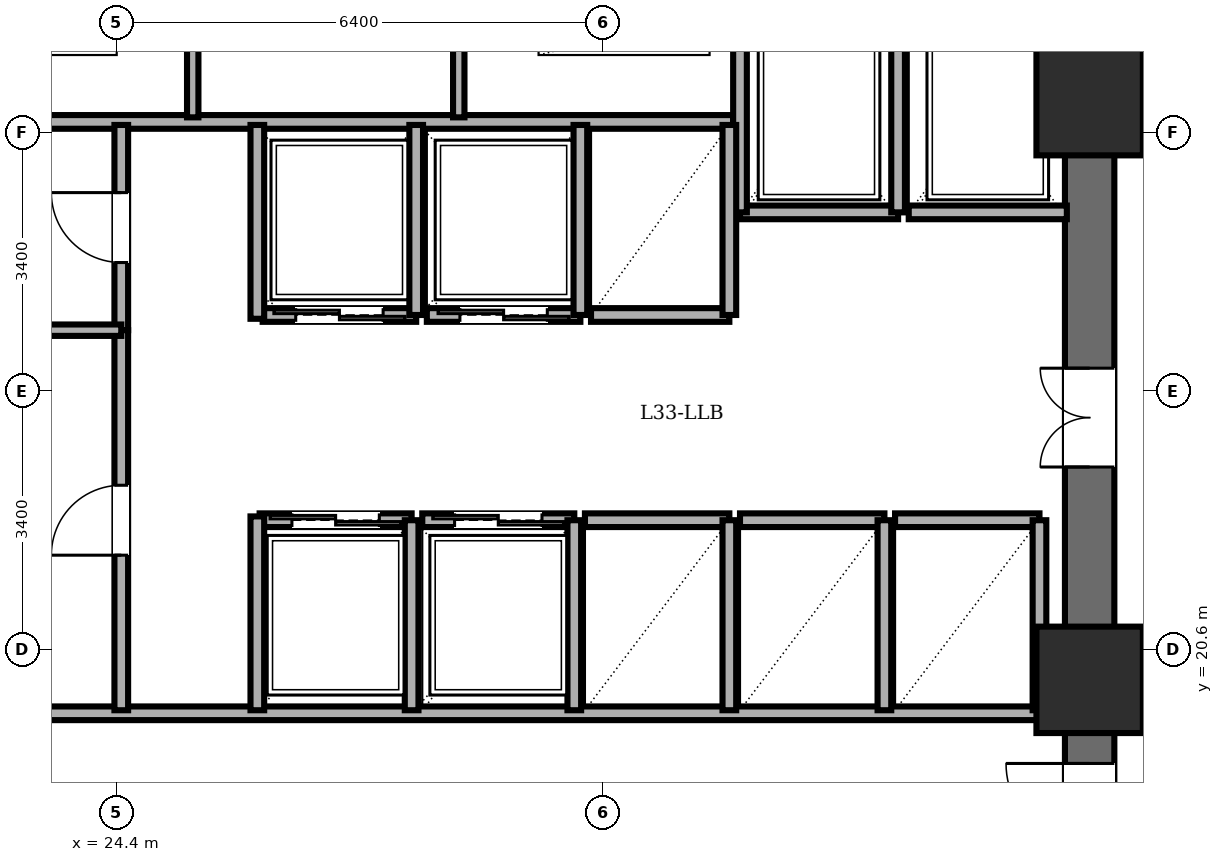
"""IFC4 building model, lengths in metres.
Left out: names, types, materials, properties, quantities, classifications, styles, units other than length and angle.
Written with IfcOpenShell. Run it as: python <this file> out.ifc"""

import sys

from ifc_helpers import new_model, si_unit, direction, frame, frame_2d, origin, origin_2d, place, context, subcontext, project, spatial, rectangle, extrude, element, fill, save


model = new_model("IFC4")
c1 = context("Model", 3, precision=1e-05, world=origin(), true_north=direction((0.0, 1.0)))
c2 = subcontext(c1, "Body", "Model", "MODEL_VIEW")
j1 = project(units=[si_unit("LENGTHUNIT", "METRE"), si_unit("PLANEANGLEUNIT", "RADIAN")], contexts=[c1])
p1 = place(None, origin())
s1 = spatial("IfcSite", under=j1, at=p1, CompositionType="ELEMENT")
p2 = place(p1, origin())
s2 = spatial("IfcBuilding", under=s1, at=p2, CompositionType="ELEMENT")
p3 = place(p2, frame((0.0, 0.0, 125.9)))
s3 = spatial("IfcBuildingStorey", under=s2, at=p3, CompositionType="ELEMENT", Elevation=125.9)
for number, where, z_axis, x_axis in (
    (1, (37.2, 20.2, 0.0), (0.0, 0.0, 1.0), (1.0, 0.0, 0.0)),
    (2, (37.2, 27.8, 0.0), (0.0, 0.0, 1.0), (1.0, 0.0, 0.0)),
):
    element("IfcColumn", number, at=place(p3, frame(where, z_axis=z_axis, x_axis=x_axis)), inside=s3, PredefinedType="COLUMN", context=c2, shape_type="SweptSolid", body=[
        extrude(rectangle(XDim=1.4, YDim=1.4, at=origin_2d()), origin(), (0.0, 0.0, 1.0), 3.6),
    ])
p4 = place(p3, frame((37.2, 14.4, 0.0), z_axis=(0.0, 0.0, 1.0), x_axis=(0.0, 1.0, 0.0)))
e3 = element("IfcWall", 3, at=p4, inside=s3, PredefinedType="SHEAR", context=c2, shape_type="SweptSolid", body=[
    extrude(rectangle(XDim=19.2, YDim=0.65, at=frame_2d((9.6, 0.0))), origin(), (0.0, 0.0, 1.0), 3.4),
])
p5 = place(p4, frame((15.8, 0.0, 0.0)))
e4 = element("IfcOpeningElement", 4, at=p5, cuts=e3, PredefinedType="OPENING", context=c2, shape_type="SweptSolid", body=[
    extrude(rectangle(XDim=1.15, YDim=2.15, at=frame_2d((0.575, 1.075))), frame((0.0, 0.335, 0.0), z_axis=(0.0, -1.0, 0.0), x_axis=(1.0, 0.0, 0.0)), (0.0, 0.0, 1.0), 0.67),
])
p6 = place(p4, frame((3.6, 0.0, 0.0)))
e5 = element("IfcOpeningElement", 5, at=p6, cuts=e3, PredefinedType="OPENING", context=c2, shape_type="SweptSolid", body=[
    extrude(rectangle(XDim=1.1, YDim=2.15, at=frame_2d((0.55, 1.075))), frame((0.0, 0.335, 0.0), z_axis=(0.0, -1.0, 0.0), x_axis=(1.0, 0.0, 0.0)), (0.0, 0.0, 1.0), 0.67),
])
p7 = place(p4, frame((8.6, 0.0, 0.0)))
e6 = element("IfcOpeningElement", 6, at=p7, cuts=e3, PredefinedType="OPENING", context=c2, shape_type="SweptSolid", body=[
    extrude(rectangle(XDim=1.3, YDim=2.2, at=frame_2d((0.65, 1.1))), frame((0.0, 0.335, 0.0), z_axis=(0.0, -1.0, 0.0), x_axis=(1.0, 0.0, 0.0)), (0.0, 0.0, 1.0), 0.67),
])
p8 = place(p3, frame((21.95, 27.54, 0.0), z_axis=(0.0, 0.0, 1.0), x_axis=(1.0, 0.0, 0.0)))
e7 = element("IfcWall", 7, at=p8, inside=s3, PredefinedType="PARTITIONING", context=c2, shape_type="SweptSolid", body=[
    extrude(rectangle(XDim=10.56, YDim=0.18, at=frame_2d((5.28, 0.0))), origin(), (0.0, 0.0, 1.0), 3.4),
])
for number, where, z_axis, x_axis in (
    (8, (25.4, 27.6, 0.0), (0.0, 0.0, 1.0), (0.0, 1.0, 0.0)),
    (9, (28.9, 27.6, 0.0), (0.0, 0.0, 1.0), (0.0, 1.0, 0.0)),
):
    element("IfcWall", number, at=place(p3, frame(where, z_axis=z_axis, x_axis=x_axis)), inside=s3, PredefinedType="PARTITIONING", context=c2, shape_type="SweptSolid", body=[
        extrude(rectangle(XDim=1.52, YDim=0.15, at=frame_2d((0.76, 0.0))), origin(), (0.0, 0.0, 1.0), 3.4),
    ])
p9 = place(p3, frame((21.95, 19.76, 0.0), z_axis=(0.0, 0.0, 1.0), x_axis=(1.0, 0.0, 0.0)))
e10 = element("IfcWall", 10, at=p9, inside=s3, PredefinedType="PARTITIONING", context=c2, shape_type="SweptSolid", body=[
    extrude(rectangle(XDim=14.87, YDim=0.18, at=frame_2d((7.435, 0.0))), origin(), (0.0, 0.0, 1.0), 3.4),
])
p10 = place(p3, frame((34.68, 26.35, 0.0), z_axis=(0.0, 0.0, 1.0), x_axis=(-1.0, 0.0, 0.0)))
e11 = element("IfcWall", 11, at=p10, inside=s3, PredefinedType="PARTITIONING", context=c2, shape_type="SweptSolid", body=[
    extrude(rectangle(XDim=2.08, YDim=0.18, at=frame_2d((1.04, 0.0))), origin(), (0.0, 0.0, 1.0), 3.4),
])
for number, where, z_axis, x_axis in (
    (12, (34.68, 26.35, 0.0), (0.0, 0.0, 1.0), (0.0, 1.0, 0.0)),
    (13, (32.6, 29.08, 0.0), (0.0, 0.0, 1.0), (0.0, -1.0, 0.0)),
):
    element("IfcWall", number, at=place(p3, frame(where, z_axis=z_axis, x_axis=x_axis)), inside=s3, PredefinedType="PARTITIONING", context=c2, shape_type="SweptSolid", body=[
        extrude(rectangle(XDim=2.73, YDim=0.18, at=frame_2d((1.365, 0.0))), origin(), (0.0, 0.0, 1.0), 3.4),
    ])
p11 = place(p3, frame((36.9, 26.35, 0.0), z_axis=(0.0, 0.0, 1.0), x_axis=(-1.0, 0.0, 0.0)))
e14 = element("IfcWall", 14, at=p11, inside=s3, PredefinedType="PARTITIONING", context=c2, shape_type="SweptSolid", body=[
    extrude(rectangle(XDim=2.08, YDim=0.18, at=frame_2d((1.04, 0.0))), origin(), (0.0, 0.0, 1.0), 3.4),
])
p12 = place(p3, frame((28.34, 25.0, 0.0), z_axis=(0.0, 0.0, 1.0), x_axis=(-1.0, 0.0, 0.0)))
e15 = element("IfcWall", 15, at=p12, inside=s3, PredefinedType="PARTITIONING", context=c2, shape_type="SweptSolid", body=[
    extrude(rectangle(XDim=2.02, YDim=0.18, at=frame_2d((1.01, 0.0))), origin(), (0.0, 0.0, 1.0), 3.4),
])
p13 = place(p12, frame((0.435, 0.0, 0.0)))
e16 = element("IfcOpeningElement", 16, at=p13, cuts=e15, PredefinedType="OPENING", context=c2, shape_type="SweptSolid", body=[
    extrude(rectangle(XDim=1.15, YDim=2.2, at=frame_2d((0.575, 1.1))), frame((0.0, 0.1, 0.0), z_axis=(0.0, -1.0, 0.0), x_axis=(1.0, 0.0, 0.0)), (0.0, 0.0, 1.0), 0.2),
])
p14 = place(p3, frame((28.34, 25.0, 0.0), z_axis=(0.0, 0.0, 1.0), x_axis=(0.0, 1.0, 0.0)))
e17 = element("IfcWall", 17, at=p14, inside=s3, PredefinedType="PARTITIONING", context=c2, shape_type="SweptSolid", body=[
    extrude(rectangle(XDim=2.5, YDim=0.18, at=frame_2d((1.25, 0.0))), origin(), (0.0, 0.0, 1.0), 3.4),
])
p15 = place(p3, frame((30.5, 25.0, 0.0), z_axis=(0.0, 0.0, 1.0), x_axis=(-1.0, 0.0, 0.0)))
e18 = element("IfcWall", 18, at=p15, inside=s3, PredefinedType="PARTITIONING", context=c2, shape_type="SweptSolid", body=[
    extrude(rectangle(XDim=2.02, YDim=0.18, at=frame_2d((1.01, 0.0))), origin(), (0.0, 0.0, 1.0), 3.4),
])
p16 = place(p15, frame((0.435, 0.0, 0.0)))
e19 = element("IfcOpeningElement", 19, at=p16, cuts=e18, PredefinedType="OPENING", context=c2, shape_type="SweptSolid", body=[
    extrude(rectangle(XDim=1.15, YDim=2.2, at=frame_2d((0.575, 1.1))), frame((0.0, 0.1, 0.0), z_axis=(0.0, -1.0, 0.0), x_axis=(1.0, 0.0, 0.0)), (0.0, 0.0, 1.0), 0.2),
])
p17 = place(p3, frame((30.5, 25.0, 0.0), z_axis=(0.0, 0.0, 1.0), x_axis=(0.0, 1.0, 0.0)))
e20 = element("IfcWall", 20, at=p17, inside=s3, PredefinedType="PARTITIONING", context=c2, shape_type="SweptSolid", body=[
    extrude(rectangle(XDim=2.5, YDim=0.18, at=frame_2d((1.25, 0.0))), origin(), (0.0, 0.0, 1.0), 3.4),
])
p18 = place(p3, frame((26.28, 22.3, 0.0), z_axis=(0.0, 0.0, 1.0), x_axis=(1.0, 0.0, 0.0)))
e21 = element("IfcWall", 21, at=p18, inside=s3, PredefinedType="PARTITIONING", context=c2, shape_type="SweptSolid", body=[
    extrude(rectangle(XDim=2.0, YDim=0.18, at=frame_2d((1.0, 0.0))), origin(), (0.0, 0.0, 1.0), 3.4),
])
p19 = place(p18, frame((0.425, 0.0, 0.0)))
e22 = element("IfcOpeningElement", 22, at=p19, cuts=e21, PredefinedType="OPENING", context=c2, shape_type="SweptSolid", body=[
    extrude(rectangle(XDim=1.15, YDim=2.2, at=frame_2d((0.575, 1.1))), frame((0.0, 0.1, 0.0), z_axis=(0.0, -1.0, 0.0), x_axis=(1.0, 0.0, 0.0)), (0.0, 0.0, 1.0), 0.2),
])
p20 = place(p3, frame((28.28, 19.8, 0.0), z_axis=(0.0, 0.0, 1.0), x_axis=(0.0, 1.0, 0.0)))
e23 = element("IfcWall", 23, at=p20, inside=s3, PredefinedType="PARTITIONING", context=c2, shape_type="SweptSolid", body=[
    extrude(rectangle(XDim=2.5, YDim=0.18, at=frame_2d((1.25, 0.0))), origin(), (0.0, 0.0, 1.0), 3.4),
])
p21 = place(p3, frame((28.42, 22.3, 0.0), z_axis=(0.0, 0.0, 1.0), x_axis=(1.0, 0.0, 0.0)))
e24 = element("IfcWall", 24, at=p21, inside=s3, PredefinedType="PARTITIONING", context=c2, shape_type="SweptSolid", body=[
    extrude(rectangle(XDim=2.0, YDim=0.18, at=frame_2d((1.0, 0.0))), origin(), (0.0, 0.0, 1.0), 3.4),
])
p22 = place(p21, frame((0.425, 0.0, 0.0)))
e25 = element("IfcOpeningElement", 25, at=p22, cuts=e24, PredefinedType="OPENING", context=c2, shape_type="SweptSolid", body=[
    extrude(rectangle(XDim=1.15, YDim=2.2, at=frame_2d((0.575, 1.1))), frame((0.0, 0.1, 0.0), z_axis=(0.0, -1.0, 0.0), x_axis=(1.0, 0.0, 0.0)), (0.0, 0.0, 1.0), 0.2),
])
p23 = place(p3, frame((30.42, 19.8, 0.0), z_axis=(0.0, 0.0, 1.0), x_axis=(0.0, 1.0, 0.0)))
e26 = element("IfcWall", 26, at=p23, inside=s3, PredefinedType="PARTITIONING", context=c2, shape_type="SweptSolid", body=[
    extrude(rectangle(XDim=2.5, YDim=0.18, at=frame_2d((1.25, 0.0))), origin(), (0.0, 0.0, 1.0), 3.4),
])
p24 = place(p3, frame((32.46, 25.0, 0.0), z_axis=(0.0, 0.0, 1.0), x_axis=(-1.0, 0.0, 0.0)))
e27 = element("IfcWall", 27, at=p24, inside=s3, PredefinedType="PARTITIONING", context=c2, shape_type="SweptSolid", body=[
    extrude(rectangle(XDim=1.82, YDim=0.18, at=frame_2d((0.91, 0.0))), origin(), (0.0, 0.0, 1.0), 3.4),
])
p25 = place(p3, frame((32.46, 25.0, 0.0), z_axis=(0.0, 0.0, 1.0), x_axis=(0.0, 1.0, 0.0)))
e28 = element("IfcWall", 28, at=p25, inside=s3, PredefinedType="PARTITIONING", context=c2, shape_type="SweptSolid", body=[
    extrude(rectangle(XDim=2.5, YDim=0.18, at=frame_2d((1.25, 0.0))), origin(), (0.0, 0.0, 1.0), 3.4),
])
p26 = place(p3, frame((30.56, 22.3, 0.0), z_axis=(0.0, 0.0, 1.0), x_axis=(1.0, 0.0, 0.0)))
e29 = element("IfcWall", 29, at=p26, inside=s3, PredefinedType="PARTITIONING", context=c2, shape_type="SweptSolid", body=[
    extrude(rectangle(XDim=1.9, YDim=0.18, at=frame_2d((0.95, 0.0))), origin(), (0.0, 0.0, 1.0), 3.4),
])
p27 = place(p3, frame((32.46, 19.8, 0.0), z_axis=(0.0, 0.0, 1.0), x_axis=(0.0, 1.0, 0.0)))
e30 = element("IfcWall", 30, at=p27, inside=s3, PredefinedType="PARTITIONING", context=c2, shape_type="SweptSolid", body=[
    extrude(rectangle(XDim=2.5, YDim=0.18, at=frame_2d((1.25, 0.0))), origin(), (0.0, 0.0, 1.0), 3.4),
])
p28 = place(p3, frame((32.6, 22.3, 0.0), z_axis=(0.0, 0.0, 1.0), x_axis=(1.0, 0.0, 0.0)))
e31 = element("IfcWall", 31, at=p28, inside=s3, PredefinedType="PARTITIONING", context=c2, shape_type="SweptSolid", body=[
    extrude(rectangle(XDim=1.9, YDim=0.18, at=frame_2d((0.95, 0.0))), origin(), (0.0, 0.0, 1.0), 3.4),
])
p29 = place(p3, frame((34.5, 19.8, 0.0), z_axis=(0.0, 0.0, 1.0), x_axis=(0.0, 1.0, 0.0)))
e32 = element("IfcWall", 32, at=p29, inside=s3, PredefinedType="PARTITIONING", context=c2, shape_type="SweptSolid", body=[
    extrude(rectangle(XDim=2.5, YDim=0.18, at=frame_2d((1.25, 0.0))), origin(), (0.0, 0.0, 1.0), 3.4),
])
p30 = place(p3, frame((34.64, 22.3, 0.0), z_axis=(0.0, 0.0, 1.0), x_axis=(1.0, 0.0, 0.0)))
e33 = element("IfcWall", 33, at=p30, inside=s3, PredefinedType="PARTITIONING", context=c2, shape_type="SweptSolid", body=[
    extrude(rectangle(XDim=1.9, YDim=0.18, at=frame_2d((0.95, 0.0))), origin(), (0.0, 0.0, 1.0), 3.4),
])
p31 = place(p3, frame((36.54, 19.8, 0.0), z_axis=(0.0, 0.0, 1.0), x_axis=(0.0, 1.0, 0.0)))
e34 = element("IfcWall", 34, at=p31, inside=s3, PredefinedType="PARTITIONING", context=c2, shape_type="SweptSolid", body=[
    extrude(rectangle(XDim=2.5, YDim=0.18, at=frame_2d((1.25, 0.0))), origin(), (0.0, 0.0, 1.0), 3.4),
])
p32 = place(p3, frame((24.46, 24.8, 0.0), z_axis=(0.0, 0.0, 1.0), x_axis=(0.0, 1.0, 0.0)))
e35 = element("IfcWall", 35, at=p32, inside=s3, PredefinedType="PARTITIONING", context=c2, shape_type="SweptSolid", body=[
    extrude(rectangle(XDim=2.7, YDim=0.18, at=frame_2d((1.35, 0.0))), origin(), (0.0, 0.0, 1.0), 3.4),
])
p33 = place(p32, frame((0.89, 0.0, 0.0)))
e36 = element("IfcOpeningElement", 36, at=p33, cuts=e35, PredefinedType="OPENING", context=c2, shape_type="SweptSolid", body=[
    extrude(rectangle(XDim=0.92, YDim=2.1, at=frame_2d((0.46, 1.05))), frame((0.0, 0.1, 0.0), z_axis=(0.0, -1.0, 0.0), x_axis=(1.0, 0.0, 0.0)), (0.0, 0.0, 1.0), 0.2),
])
p34 = place(p3, frame((24.46, 19.8, 0.0), z_axis=(0.0, 0.0, 1.0), x_axis=(0.0, 1.0, 0.0)))
e37 = element("IfcWall", 37, at=p34, inside=s3, PredefinedType="PARTITIONING", context=c2, shape_type="SweptSolid", body=[
    extrude(rectangle(XDim=5.0, YDim=0.18, at=frame_2d((2.5, 0.0))), origin(), (0.0, 0.0, 1.0), 3.4),
])
p35 = place(p34, frame((2.04, 0.0, 0.0)))
e38 = element("IfcOpeningElement", 38, at=p35, cuts=e37, PredefinedType="OPENING", context=c2, shape_type="SweptSolid", body=[
    extrude(rectangle(XDim=0.92, YDim=2.1, at=frame_2d((0.46, 1.05))), frame((0.0, 0.1, 0.0), z_axis=(0.0, -1.0, 0.0), x_axis=(1.0, 0.0, 0.0)), (0.0, 0.0, 1.0), 0.2),
])
p36 = place(p3, frame((21.95, 24.8, 0.0), z_axis=(0.0, 0.0, 1.0), x_axis=(1.0, 0.0, 0.0)))
e39 = element("IfcWall", 39, at=p36, inside=s3, PredefinedType="PARTITIONING", context=c2, shape_type="SweptSolid", body=[
    extrude(rectangle(XDim=2.51, YDim=0.15, at=frame_2d((1.255, 0.0))), origin(), (0.0, 0.0, 1.0), 3.4),
])
for number, where, z_axis, x_axis in (
    (40, (26.25, 24.95, 0.0), (0.0, 0.0, 1.0), (0.0, 1.0, 0.0)),
    (41, (26.25, 19.8, 0.0), (0.0, 0.0, 1.0), (0.0, 1.0, 0.0)),
):
    element("IfcWall", number, at=place(p3, frame(where, z_axis=z_axis, x_axis=x_axis)), inside=s3, PredefinedType="PARTITIONING", context=c2, shape_type="SweptSolid", body=[
        extrude(rectangle(XDim=2.55, YDim=0.18, at=frame_2d((1.275, 0.0))), origin(), (0.0, 0.0, 1.0), 3.4),
    ])
p37 = place(p6, origin())
e42 = element("IfcDoor", 42, at=p37, inside=s3, OperationType="SINGLE_SWING_RIGHT", PredefinedType="DOOR", context=c2, shape_type="SweptSolid", body=[
    extrude(rectangle(XDim=1.1, YDim=2.15, at=frame_2d((0.55, 1.075))), frame((0.0, 0.025, 0.0), z_axis=(0.0, -1.0, 0.0), x_axis=(1.0, 0.0, 0.0)), (0.0, 0.0, 1.0), 0.05),
])
fill(e5, e42)
p38 = place(p13, origin())
e43 = element("IfcDoor", 43, at=p38, inside=s3, OperationType="DOUBLE_DOOR_SLIDING", PredefinedType="DOOR", context=c2, shape_type="SweptSolid", body=[
    extrude(rectangle(XDim=1.15, YDim=2.2, at=frame_2d((0.575, 1.1))), frame((0.0, 0.025, 0.0), z_axis=(0.0, -1.0, 0.0), x_axis=(1.0, 0.0, 0.0)), (0.0, 0.0, 1.0), 0.05),
])
fill(e16, e43)
p39 = place(p16, origin())
e44 = element("IfcDoor", 44, at=p39, inside=s3, OperationType="DOUBLE_DOOR_SLIDING", PredefinedType="DOOR", context=c2, shape_type="SweptSolid", body=[
    extrude(rectangle(XDim=1.15, YDim=2.2, at=frame_2d((0.575, 1.1))), frame((0.0, 0.025, 0.0), z_axis=(0.0, -1.0, 0.0), x_axis=(1.0, 0.0, 0.0)), (0.0, 0.0, 1.0), 0.05),
])
fill(e19, e44)
p40 = place(p19, origin())
e45 = element("IfcDoor", 45, at=p40, inside=s3, OperationType="DOUBLE_DOOR_SLIDING", PredefinedType="DOOR", context=c2, shape_type="SweptSolid", body=[
    extrude(rectangle(XDim=1.15, YDim=2.2, at=frame_2d((0.575, 1.1))), frame((0.0, 0.025, 0.0), z_axis=(0.0, -1.0, 0.0), x_axis=(1.0, 0.0, 0.0)), (0.0, 0.0, 1.0), 0.05),
])
fill(e22, e45)
p41 = place(p22, origin())
e46 = element("IfcDoor", 46, at=p41, inside=s3, OperationType="DOUBLE_DOOR_SLIDING", PredefinedType="DOOR", context=c2, shape_type="SweptSolid", body=[
    extrude(rectangle(XDim=1.15, YDim=2.2, at=frame_2d((0.575, 1.1))), frame((0.0, 0.025, 0.0), z_axis=(0.0, -1.0, 0.0), x_axis=(1.0, 0.0, 0.0)), (0.0, 0.0, 1.0), 0.05),
])
fill(e25, e46)
p42 = place(p33, origin())
e47 = element("IfcDoor", 47, at=p42, inside=s3, OperationType="SINGLE_SWING_RIGHT", PredefinedType="DOOR", context=c2, shape_type="SweptSolid", body=[
    extrude(rectangle(XDim=0.92, YDim=2.1, at=frame_2d((0.46, 1.05))), frame((0.0, 0.025, 0.0), z_axis=(0.0, -1.0, 0.0), x_axis=(1.0, 0.0, 0.0)), (0.0, 0.0, 1.0), 0.05),
])
fill(e36, e47)
p43 = place(p35, origin())
e48 = element("IfcDoor", 48, at=p43, inside=s3, OperationType="SINGLE_SWING_LEFT", PredefinedType="DOOR", context=c2, shape_type="SweptSolid", body=[
    extrude(rectangle(XDim=0.92, YDim=2.1, at=frame_2d((0.46, 1.05))), frame((0.0, 0.025, 0.0), z_axis=(0.0, -1.0, 0.0), x_axis=(1.0, 0.0, 0.0)), (0.0, 0.0, 1.0), 0.05),
])
fill(e38, e48)
p44 = place(p7, origin())
e49 = element("IfcDoor", 49, at=p44, inside=s3, OperationType="DOUBLE_DOOR_SINGLE_SWING", PredefinedType="DOOR", context=c2, shape_type="SweptSolid", body=[
    extrude(rectangle(XDim=1.3, YDim=2.2, at=frame_2d((0.65, 1.1))), frame((0.0, 0.025, 0.0), z_axis=(0.0, -1.0, 0.0), x_axis=(1.0, 0.0, 0.0)), (0.0, 0.0, 1.0), 0.05),
])
fill(e6, e49)
save(model, sys.argv[1])
